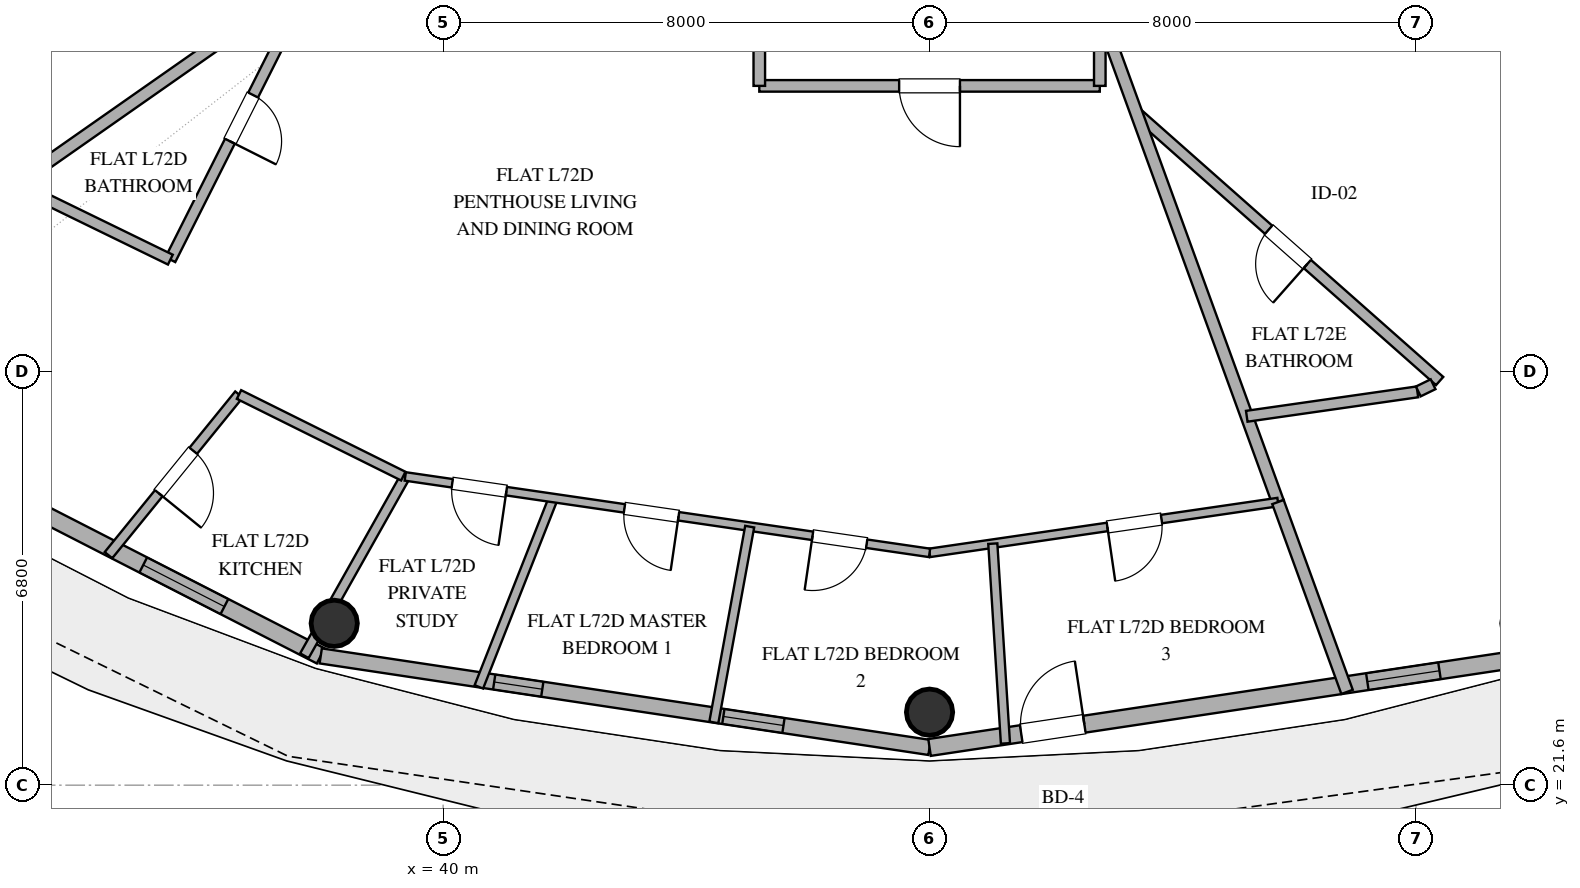
"""IFC4 building model, lengths in metres.
Left out: names, types, materials, properties, quantities, classifications, styles, units other than length and angle.
Written with IfcOpenShell. Run it as: python <this file> out.ifc"""

import sys

from ifc_helpers import new_model, si_unit, direction, frame, frame_2d, origin, origin_2d, place, context, subcontext, project, spatial, rectangle, hollow_circle, extrude, element, fill, save


model = new_model("IFC4")
c1 = context("Model", 3, precision=1e-05, world=origin(), true_north=direction((0.0, 1.0)))
c2 = subcontext(c1, "Body", "Model", "MODEL_VIEW")
j1 = project(units=[si_unit("LENGTHUNIT", "METRE"), si_unit("PLANEANGLEUNIT", "RADIAN")], contexts=[c1])
p1 = place(None, origin())
s1 = spatial("IfcSite", under=j1, at=p1, CompositionType="ELEMENT")
p2 = place(p1, origin())
s2 = spatial("IfcBuilding", under=s1, at=p2, CompositionType="ELEMENT")
p3 = place(p2, frame((0.0, 0.0, 280.2)))
s3 = spatial("IfcBuildingStorey", under=s2, at=p3, CompositionType="ELEMENT", Elevation=280.2)
for number, where, z_axis, x_axis in (
    (1, (38.209, 24.261, 0.0), (0.0, 0.0, 1.0), (1.0, 0.0, 0.0)),
    (2, (48.0, 22.8, 0.0), (0.0, 0.0, 1.0), (1.0, 0.0, 0.0)),
):
    element("IfcColumn", number, at=place(p3, frame(where, z_axis=z_axis, x_axis=x_axis)), inside=s3, PredefinedType="COLUMN", context=c2, shape_type="SweptSolid", body=[
        extrude(hollow_circle(Radius=0.381, WallThickness=0.025, at=origin_2d()), origin(), (0.0, 0.0, 1.0), 3.37),
    ])
p4 = place(p3, frame((29.617, 28.013, 0.0), z_axis=(0.0, 0.0, 1.0), x_axis=(0.890007394051, -0.455946091699, 0.0)))
e3 = element("IfcWall", 3, at=p4, inside=s3, PredefinedType="SOLIDWALL", context=c2, shape_type="SweptSolid", body=[
    extrude(rectangle(XDim=9.404, YDim=0.28, at=frame_2d((4.702, 0.0))), origin(), (0.0, 0.0, 1.0), 3.37),
])
p5 = place(p4, frame((2.684, 0.0, 0.85)))
e4 = element("IfcOpeningElement", 4, at=p5, cuts=e3, PredefinedType="OPENING", context=c2, shape_type="SweptSolid", body=[
    extrude(rectangle(XDim=1.5, YDim=2.0, at=frame_2d((0.75, 1.0))), frame((0.0, 0.15, 0.0), z_axis=(0.0, -1.0, 0.0), x_axis=(1.0, 0.0, 0.0)), (0.0, 0.0, 1.0), 0.3),
])
p6 = place(p4, frame((6.125, 0.0, 0.85)))
e5 = element("IfcOpeningElement", 5, at=p6, cuts=e3, PredefinedType="OPENING", context=c2, shape_type="SweptSolid", body=[
    extrude(rectangle(XDim=1.5, YDim=1.8, at=frame_2d((0.75, 0.9))), frame((0.0, 0.15, 0.0), z_axis=(0.0, -1.0, 0.0), x_axis=(1.0, 0.0, 0.0)), (0.0, 0.0, 1.0), 0.3),
])
p7 = place(p3, frame((37.987, 23.726, 0.0), z_axis=(0.0, 0.0, 1.0), x_axis=(0.988882522213, -0.148698881169, 0.0)))
e6 = element("IfcWall", 6, at=p7, inside=s3, PredefinedType="SOLIDWALL", context=c2, shape_type="SweptSolid", body=[
    extrude(rectangle(XDim=10.125, YDim=0.25, at=frame_2d((5.062, 0.0))), origin(), (0.0, 0.0, 1.0), 3.37),
])
p8 = place(p7, frame((2.885, 0.0, 1.54)))
e7 = element("IfcOpeningElement", 7, at=p8, cuts=e6, PredefinedType="OPENING", context=c2, shape_type="SweptSolid", body=[
    extrude(rectangle(XDim=0.8, YDim=1.0, at=frame_2d((0.4, 0.5))), frame((0.0, 0.135, 0.0), z_axis=(0.0, -1.0, 0.0), x_axis=(1.0, 0.0, 0.0)), (0.0, 0.0, 1.0), 0.27),
])
p9 = place(p7, frame((6.696, 0.0, 0.35)))
e8 = element("IfcOpeningElement", 8, at=p9, cuts=e6, PredefinedType="OPENING", context=c2, shape_type="SweptSolid", body=[
    extrude(rectangle(XDim=1.0, YDim=1.05, at=frame_2d((0.5, 0.525))), frame((0.0, 0.135, 0.0), z_axis=(0.0, -1.0, 0.0), x_axis=(1.0, 0.0, 0.0)), (0.0, 0.0, 1.0), 0.27),
])
p10 = place(p3, frame((48.0, 22.22, 0.0), z_axis=(0.0, 0.0, 1.0), x_axis=(0.988882522213, 0.148698881169, 0.0)))
e9 = element("IfcWall", 9, at=p10, inside=s3, PredefinedType="SOLIDWALL", context=c2, shape_type="SweptSolid", body=[
    extrude(rectangle(XDim=10.125, YDim=0.28, at=frame_2d((5.062, 0.0))), origin(), (0.0, 0.0, 1.0), 3.37),
])
p11 = place(p10, frame((1.524, 0.0, 0.0)))
e10 = element("IfcOpeningElement", 10, at=p11, cuts=e9, PredefinedType="OPENING", context=c2, shape_type="SweptSolid", body=[
    extrude(rectangle(XDim=1.05, YDim=2.2, at=frame_2d((0.525, 1.1))), frame((0.0, 0.15, 0.0), z_axis=(0.0, -1.0, 0.0), x_axis=(1.0, 0.0, 0.0)), (0.0, 0.0, 1.0), 0.3),
])
p12 = place(p10, frame((7.281, 0.0, 0.85)))
e11 = element("IfcOpeningElement", 11, at=p12, cuts=e9, PredefinedType="OPENING", context=c2, shape_type="SweptSolid", body=[
    extrude(rectangle(XDim=1.2, YDim=1.8, at=frame_2d((0.6, 0.9))), frame((0.0, 0.15, 0.0), z_axis=(0.0, -1.0, 0.0), x_axis=(1.0, 0.0, 0.0)), (0.0, 0.0, 1.0), 0.3),
])
p13 = place(p3, frame((56.389, 28.246, 0.0), z_axis=(0.0, 0.0, 1.0), x_axis=(-0.749087509224, 0.662471058632, 0.0)))
e12 = element("IfcWall", 12, at=p13, inside=s3, PredefinedType="PLUMBINGWALL", context=c2, shape_type="SweptSolid", body=[
    extrude(rectangle(XDim=6.66, YDim=0.18, at=frame_2d((3.33, 0.0))), origin(), (0.0, 0.0, 1.0), 2.73),
])
p14 = place(p13, frame((2.905, 0.0, 0.0)))
e13 = element("IfcOpeningElement", 13, at=p14, cuts=e12, PredefinedType="OPENING", context=c2, shape_type="SweptSolid", body=[
    extrude(rectangle(XDim=0.85, YDim=2.1, at=frame_2d((0.425, 1.05))), frame((0.0, 0.1, 0.0), z_axis=(0.0, -1.0, 0.0), x_axis=(1.0, 0.0, 0.0)), (0.0, 0.0, 1.0), 0.2),
])
p15 = place(p3, frame((50.8, 33.1, 0.0), z_axis=(0.0, 0.0, 1.0), x_axis=(-1.0, 0.0, 0.0)))
e14 = element("IfcWall", 14, at=p15, inside=s3, PredefinedType="PARTITIONING", context=c2, shape_type="SweptSolid", body=[
    extrude(rectangle(XDim=5.6, YDim=0.19, at=frame_2d((2.8, 0.0))), origin(), (0.0, 0.0, 1.0), 2.73),
])
p16 = place(p15, frame((2.3, 0.0, 0.0)))
e15 = element("IfcOpeningElement", 15, at=p16, cuts=e14, PredefinedType="OPENING", context=c2, shape_type="SweptSolid", body=[
    extrude(rectangle(XDim=1.0, YDim=2.2, at=frame_2d((0.5, 1.1))), frame((0.0, 0.105, 0.0), z_axis=(0.0, -1.0, 0.0), x_axis=(1.0, 0.0, 0.0)), (0.0, 0.0, 1.0), 0.21),
])
p17 = place(p3, frame((50.8, 34.307, 0.0), z_axis=(0.0, 0.0, 1.0), x_axis=(0.342010724278, -0.939696048985, 0.0)))
e16 = element("IfcWall", 16, at=p17, inside=s3, PredefinedType="PARTITIONING", context=c2, shape_type="SweptSolid", body=[
    extrude(rectangle(XDim=8.568, YDim=0.2, at=frame_2d((4.284, 0.0))), origin(), (0.0, 0.0, 1.0), 2.73),
])
p18 = place(p3, frame((37.855, 34.896, 0.0), z_axis=(0.0, 0.0, 1.0), x_axis=(-0.449274589412, -0.893393722447, 0.0)))
e17 = element("IfcWall", 17, at=p18, inside=s3, PredefinedType="PLUMBINGWALL", context=c2, shape_type="SweptSolid", body=[
    extrude(rectangle(XDim=5.209, YDim=0.18, at=frame_2d((2.604, 0.0))), origin(), (0.0, 0.0, 1.0), 2.73),
])
p19 = place(p18, frame((2.18, 0.0, 0.0)))
e18 = element("IfcOpeningElement", 18, at=p19, cuts=e17, PredefinedType="OPENING", context=c2, shape_type="SweptSolid", body=[
    extrude(rectangle(XDim=0.85, YDim=2.1, at=frame_2d((0.425, 1.05))), frame((0.0, 0.1, 0.0), z_axis=(0.0, -1.0, 0.0), x_axis=(1.0, 0.0, 0.0)), (0.0, 0.0, 1.0), 0.2),
])
p20 = place(p3, frame((36.575, 34.0, 0.0), z_axis=(0.0, 0.0, 1.0), x_axis=(-0.819138444565, -0.57359585828, 0.0)))
e19 = element("IfcWall", 19, at=p20, inside=s3, PredefinedType="PARTITIONING", context=c2, shape_type="SweptSolid", body=[
    extrude(rectangle(XDim=9.326, YDim=0.2, at=frame_2d((4.663, 0.0))), origin(), (0.0, 0.0, 1.0), 2.73),
])
p21 = place(p3, frame((53.73, 26.256, 0.0), z_axis=(0.0, 0.0, 1.0), x_axis=(-0.989539000253, -0.144265612597, 0.0)))
e20 = element("IfcWall", 20, at=p21, inside=s3, PredefinedType="PARTITIONING", context=c2, shape_type="SweptSolid", body=[
    extrude(rectangle(XDim=5.791, YDim=0.14, at=frame_2d((2.896, 0.0))), origin(), (0.0, 0.0, 1.0), 2.73),
])
p22 = place(p21, frame((1.936, 0.0, 0.0)))
e21 = element("IfcOpeningElement", 21, at=p22, cuts=e20, PredefinedType="OPENING", context=c2, shape_type="SweptSolid", body=[
    extrude(rectangle(XDim=0.9, YDim=2.1, at=frame_2d((0.45, 1.05))), frame((0.0, 0.08, 0.0), z_axis=(0.0, -1.0, 0.0), x_axis=(1.0, 0.0, 0.0)), (0.0, 0.0, 1.0), 0.16),
])
p23 = place(p3, frame((36.643, 28.024, 0.0), z_axis=(0.0, 0.0, 1.0), x_axis=(-0.630641219738, -0.776074514442, 0.0)))
e22 = element("IfcWall", 22, at=p23, inside=s3, PredefinedType="PLUMBINGWALL", context=c2, shape_type="SweptSolid", body=[
    extrude(rectangle(XDim=3.405, YDim=0.16, at=frame_2d((1.702, 0.0))), origin(), (0.0, 0.0, 1.0), 2.73),
])
p24 = place(p23, frame((1.192, 0.0, 0.0)))
e23 = element("IfcOpeningElement", 23, at=p24, cuts=e22, PredefinedType="OPENING", context=c2, shape_type="SweptSolid", body=[
    extrude(rectangle(XDim=0.9, YDim=2.1, at=frame_2d((0.45, 1.05))), frame((0.0, 0.09, 0.0), z_axis=(0.0, -1.0, 0.0), x_axis=(1.0, 0.0, 0.0)), (0.0, 0.0, 1.0), 0.18),
])
p25 = place(p3, frame((37.719, 23.729, 0.0), z_axis=(0.0, 0.0, 1.0), x_axis=(0.490408553136, 0.871492656889, 0.0)))
e24 = element("IfcWall", 24, at=p25, inside=s3, PredefinedType="PLUMBINGWALL", context=c2, shape_type="SweptSolid", body=[
    extrude(rectangle(XDim=3.383, YDim=0.16, at=frame_2d((1.692, 0.0))), origin(), (0.0, 0.0, 1.0), 2.73),
])
p26 = place(p3, frame((41.813, 26.322, 0.0), z_axis=(0.0, 0.0, 1.0), x_axis=(-0.366986730156, -0.930226176738, 0.0)))
e25 = element("IfcWall", 25, at=p26, inside=s3, PredefinedType="PARTITIONING", context=c2, shape_type="SweptSolid", body=[
    extrude(rectangle(XDim=3.339, YDim=0.15, at=frame_2d((1.669, 0.0))), origin(), (0.0, 0.0, 1.0), 2.73),
])
p27 = place(p3, frame((48.0, 25.42, 0.0), z_axis=(0.0, 0.0, 1.0), x_axis=(-0.989534564718, 0.144296033307, 0.0)))
e26 = element("IfcWall", 26, at=p27, inside=s3, PredefinedType="PARTITIONING", context=c2, shape_type="SweptSolid", body=[
    extrude(rectangle(XDim=8.714, YDim=0.14, at=frame_2d((4.357, 0.0))), origin(), (0.0, 0.0, 1.0), 2.73),
])
p28 = place(p27, frame((4.171, 0.0, 0.0)))
e27 = element("IfcOpeningElement", 27, at=p28, cuts=e26, PredefinedType="OPENING", context=c2, shape_type="SweptSolid", body=[
    extrude(rectangle(XDim=0.9, YDim=2.1, at=frame_2d((0.45, 1.05))), frame((0.0, 0.08, 0.0), z_axis=(0.0, -1.0, 0.0), x_axis=(1.0, 0.0, 0.0)), (0.0, 0.0, 1.0), 0.16),
])
p29 = place(p27, frame((1.045, 0.0, 0.0)))
e28 = element("IfcOpeningElement", 28, at=p29, cuts=e26, PredefinedType="OPENING", context=c2, shape_type="SweptSolid", body=[
    extrude(rectangle(XDim=0.9, YDim=2.1, at=frame_2d((0.45, 1.05))), frame((0.0, 0.08, 0.0), z_axis=(0.0, -1.0, 0.0), x_axis=(1.0, 0.0, 0.0)), (0.0, 0.0, 1.0), 0.16),
])
p30 = place(p27, frame((7.033, 0.0, 0.0)))
e29 = element("IfcOpeningElement", 29, at=p30, cuts=e26, PredefinedType="OPENING", context=c2, shape_type="SweptSolid", body=[
    extrude(rectangle(XDim=0.9, YDim=2.1, at=frame_2d((0.45, 1.05))), frame((0.0, 0.08, 0.0), z_axis=(0.0, -1.0, 0.0), x_axis=(1.0, 0.0, 0.0)), (0.0, 0.0, 1.0), 0.16),
])
p31 = place(p3, frame((53.73, 26.256, 0.0), z_axis=(0.0, 0.0, 1.0), x_axis=(0.341990855898, -0.939703280021, 0.0)))
e30 = element("IfcWall", 30, at=p31, inside=s3, PredefinedType="PARTITIONING", context=c2, shape_type="SweptSolid", body=[
    extrude(rectangle(XDim=3.323, YDim=0.2, at=frame_2d((1.661, 0.0))), origin(), (0.0, 0.0, 1.0), 2.73),
])
p32 = place(p3, frame((49.04, 25.572, 0.0), z_axis=(0.0, 0.0, 1.0), x_axis=(0.063195614113, -0.998001159497, 0.0)))
e31 = element("IfcWall", 31, at=p32, inside=s3, PredefinedType="PARTITIONING", context=c2, shape_type="SweptSolid", body=[
    extrude(rectangle(XDim=3.292, YDim=0.15, at=frame_2d((1.646, 0.0))), origin(), (0.0, 0.0, 1.0), 2.73),
])
p33 = place(p3, frame((44.452, 22.632, 0.0), z_axis=(0.0, 0.0, 1.0), x_axis=(0.180152248802, 0.983638738182, 0.0)))
e32 = element("IfcWall", 32, at=p33, inside=s3, PredefinedType="PARTITIONING", context=c2, shape_type="SweptSolid", body=[
    extrude(rectangle(XDim=3.273, YDim=0.15, at=frame_2d((1.636, 0.0))), origin(), (0.0, 0.0, 1.0), 2.73),
])
p34 = place(p3, frame((39.345, 26.682, 0.0), z_axis=(0.0, 0.0, 1.0), x_axis=(-0.895589359885, 0.44488166793, 0.0)))
e33 = element("IfcWall", 33, at=p34, inside=s3, PredefinedType="PLUMBINGWALL", context=c2, shape_type="SweptSolid", body=[
    extrude(rectangle(XDim=3.017, YDim=0.16, at=frame_2d((1.509, 0.0))), origin(), (0.0, 0.0, 1.0), 2.73),
])
p35 = place(p3, frame((53.217, 27.666, 0.0), z_axis=(0.0, 0.0, 1.0), x_axis=(0.989918473044, 0.141638330709, 0.0)))
e34 = element("IfcWall", 34, at=p35, inside=s3, PredefinedType="PLUMBINGWALL", context=c2, shape_type="SweptSolid", body=[
    extrude(rectangle(XDim=2.835, YDim=0.18, at=frame_2d((1.418, 0.0))), origin(), (0.0, 0.0, 1.0), 2.73),
])
p36 = place(p3, frame((35.514, 30.242, 0.0), z_axis=(0.0, 0.0, 1.0), x_axis=(-0.898915857852, 0.438121307975, 0.0)))
e35 = element("IfcWall", 35, at=p36, inside=s3, PredefinedType="PLUMBINGWALL", context=c2, shape_type="SweptSolid", body=[
    extrude(rectangle(XDim=2.498, YDim=0.18, at=frame_2d((1.249, 0.0))), origin(), (0.0, 0.0, 1.0), 2.73),
])
for number, where, z_axis, x_axis in (
    (36, (45.2, 33.1, 0.0), (0.0, 0.0, 1.0), (0.0, 1.0, 0.0)),
    (37, (50.8, 35.2, 0.0), (0.0, 0.0, 1.0), (0.0, -1.0, 0.0)),
):
    element("IfcWall", number, at=place(p3, frame(where, z_axis=z_axis, x_axis=x_axis)), inside=s3, PredefinedType="PARTITIONING", context=c2, shape_type="SweptSolid", body=[
        extrude(rectangle(XDim=2.1, YDim=0.19, at=frame_2d((1.05, 0.0))), origin(), (0.0, 0.0, 1.0), 2.73),
    ])
p37 = place(p3, frame((56.038, 28.075, 0.0), z_axis=(0.0, 0.0, 1.0), x_axis=(0.899071871525, 0.437801061937, 0.0)))
e38 = element("IfcWall", 38, at=p37, inside=s3, PredefinedType="PLUMBINGWALL", context=c2, shape_type="SweptSolid", body=[
    extrude(rectangle(XDim=0.271, YDim=0.18, at=frame_2d((0.135, 0.0))), origin(), (0.0, 0.0, 1.0), 2.73),
])
p38 = place(p6, origin())
e39 = element("IfcWindow", 39, at=p38, inside=s3, PartitioningType="SINGLE_PANEL", PredefinedType="WINDOW", context=c2, shape_type="SweptSolid", body=[
    extrude(rectangle(XDim=1.5, YDim=1.8, at=frame_2d((0.75, 0.9))), frame((0.0, 0.03, 0.0), z_axis=(0.0, -1.0, 0.0), x_axis=(1.0, 0.0, 0.0)), (0.0, 0.0, 1.0), 0.06),
])
fill(e5, e39)
p39 = place(p11, origin())
e40 = element("IfcDoor", 40, at=p39, inside=s3, OperationType="SINGLE_SWING_RIGHT", PredefinedType="DOOR", context=c2, shape_type="SweptSolid", body=[
    extrude(rectangle(XDim=1.05, YDim=2.2, at=frame_2d((0.525, 1.1))), frame((0.0, 0.025, 0.0), z_axis=(0.0, -1.0, 0.0), x_axis=(1.0, 0.0, 0.0)), (0.0, 0.0, 1.0), 0.05),
])
fill(e10, e40)
p40 = place(p12, origin())
e41 = element("IfcWindow", 41, at=p40, inside=s3, PartitioningType="SINGLE_PANEL", PredefinedType="WINDOW", context=c2, shape_type="SweptSolid", body=[
    extrude(rectangle(XDim=1.2, YDim=1.8, at=frame_2d((0.6, 0.9))), frame((0.0, 0.03, 0.0), z_axis=(0.0, -1.0, 0.0), x_axis=(1.0, 0.0, 0.0)), (0.0, 0.0, 1.0), 0.06),
])
fill(e11, e41)
p41 = place(p8, origin())
e42 = element("IfcWindow", 42, at=p41, inside=s3, PartitioningType="SINGLE_PANEL", PredefinedType="WINDOW", context=c2, shape_type="SweptSolid", body=[
    extrude(rectangle(XDim=0.8, YDim=1.0, at=frame_2d((0.4, 0.5))), frame((0.0, 0.03, 0.0), z_axis=(0.0, -1.0, 0.0), x_axis=(1.0, 0.0, 0.0)), (0.0, 0.0, 1.0), 0.06),
])
fill(e7, e42)
p42 = place(p9, origin())
e43 = element("IfcWindow", 43, at=p42, inside=s3, PartitioningType="SINGLE_PANEL", PredefinedType="WINDOW", context=c2, shape_type="SweptSolid", body=[
    extrude(rectangle(XDim=1.0, YDim=1.05, at=frame_2d((0.5, 0.525))), frame((0.0, 0.03, 0.0), z_axis=(0.0, -1.0, 0.0), x_axis=(1.0, 0.0, 0.0)), (0.0, 0.0, 1.0), 0.06),
])
fill(e8, e43)
p43 = place(p14, origin())
e44 = element("IfcDoor", 44, at=p43, inside=s3, OperationType="SINGLE_SWING_LEFT", PredefinedType="DOOR", context=c2, shape_type="SweptSolid", body=[
    extrude(rectangle(XDim=0.85, YDim=2.1, at=frame_2d((0.425, 1.05))), frame((0.0, 0.025, 0.0), z_axis=(0.0, -1.0, 0.0), x_axis=(1.0, 0.0, 0.0)), (0.0, 0.0, 1.0), 0.05),
])
fill(e13, e44)
p44 = place(p16, origin())
e45 = element("IfcDoor", 45, at=p44, inside=s3, OperationType="SINGLE_SWING_LEFT", PredefinedType="DOOR", context=c2, shape_type="SweptSolid", body=[
    extrude(rectangle(XDim=1.0, YDim=2.2, at=frame_2d((0.5, 1.1))), frame((0.0, 0.025, 0.0), z_axis=(0.0, -1.0, 0.0), x_axis=(1.0, 0.0, 0.0)), (0.0, 0.0, 1.0), 0.05),
])
fill(e15, e45)
p45 = place(p19, origin())
e46 = element("IfcDoor", 46, at=p45, inside=s3, OperationType="SINGLE_SWING_RIGHT", PredefinedType="DOOR", context=c2, shape_type="SweptSolid", body=[
    extrude(rectangle(XDim=0.85, YDim=2.1, at=frame_2d((0.425, 1.05))), frame((0.0, 0.025, 0.0), z_axis=(0.0, -1.0, 0.0), x_axis=(1.0, 0.0, 0.0)), (0.0, 0.0, 1.0), 0.05),
])
fill(e18, e46)
p46 = place(p22, origin())
e47 = element("IfcDoor", 47, at=p46, inside=s3, OperationType="SINGLE_SWING_RIGHT", PredefinedType="DOOR", context=c2, shape_type="SweptSolid", body=[
    extrude(rectangle(XDim=0.9, YDim=2.1, at=frame_2d((0.45, 1.05))), frame((0.0, 0.025, 0.0), z_axis=(0.0, -1.0, 0.0), x_axis=(1.0, 0.0, 0.0)), (0.0, 0.0, 1.0), 0.05),
])
fill(e21, e47)
p47 = place(p24, origin())
e48 = element("IfcDoor", 48, at=p47, inside=s3, OperationType="SINGLE_SWING_RIGHT", PredefinedType="DOOR", context=c2, shape_type="SweptSolid", body=[
    extrude(rectangle(XDim=0.9, YDim=2.1, at=frame_2d((0.45, 1.05))), frame((0.0, 0.025, 0.0), z_axis=(0.0, -1.0, 0.0), x_axis=(1.0, 0.0, 0.0)), (0.0, 0.0, 1.0), 0.05),
])
fill(e23, e48)
p48 = place(p28, origin())
e49 = element("IfcDoor", 49, at=p48, inside=s3, OperationType="SINGLE_SWING_LEFT", PredefinedType="DOOR", context=c2, shape_type="SweptSolid", body=[
    extrude(rectangle(XDim=0.9, YDim=2.1, at=frame_2d((0.45, 1.05))), frame((0.0, 0.025, 0.0), z_axis=(0.0, -1.0, 0.0), x_axis=(1.0, 0.0, 0.0)), (0.0, 0.0, 1.0), 0.05),
])
fill(e27, e49)
p49 = place(p29, origin())
e50 = element("IfcDoor", 50, at=p49, inside=s3, OperationType="SINGLE_SWING_RIGHT", PredefinedType="DOOR", context=c2, shape_type="SweptSolid", body=[
    extrude(rectangle(XDim=0.9, YDim=2.1, at=frame_2d((0.45, 1.05))), frame((0.0, 0.025, 0.0), z_axis=(0.0, -1.0, 0.0), x_axis=(1.0, 0.0, 0.0)), (0.0, 0.0, 1.0), 0.05),
])
fill(e28, e50)
p50 = place(p30, origin())
e51 = element("IfcDoor", 51, at=p50, inside=s3, OperationType="SINGLE_SWING_LEFT", PredefinedType="DOOR", context=c2, shape_type="SweptSolid", body=[
    extrude(rectangle(XDim=0.9, YDim=2.1, at=frame_2d((0.45, 1.05))), frame((0.0, 0.025, 0.0), z_axis=(0.0, -1.0, 0.0), x_axis=(1.0, 0.0, 0.0)), (0.0, 0.0, 1.0), 0.05),
])
fill(e29, e51)
save(model, sys.argv[1])
